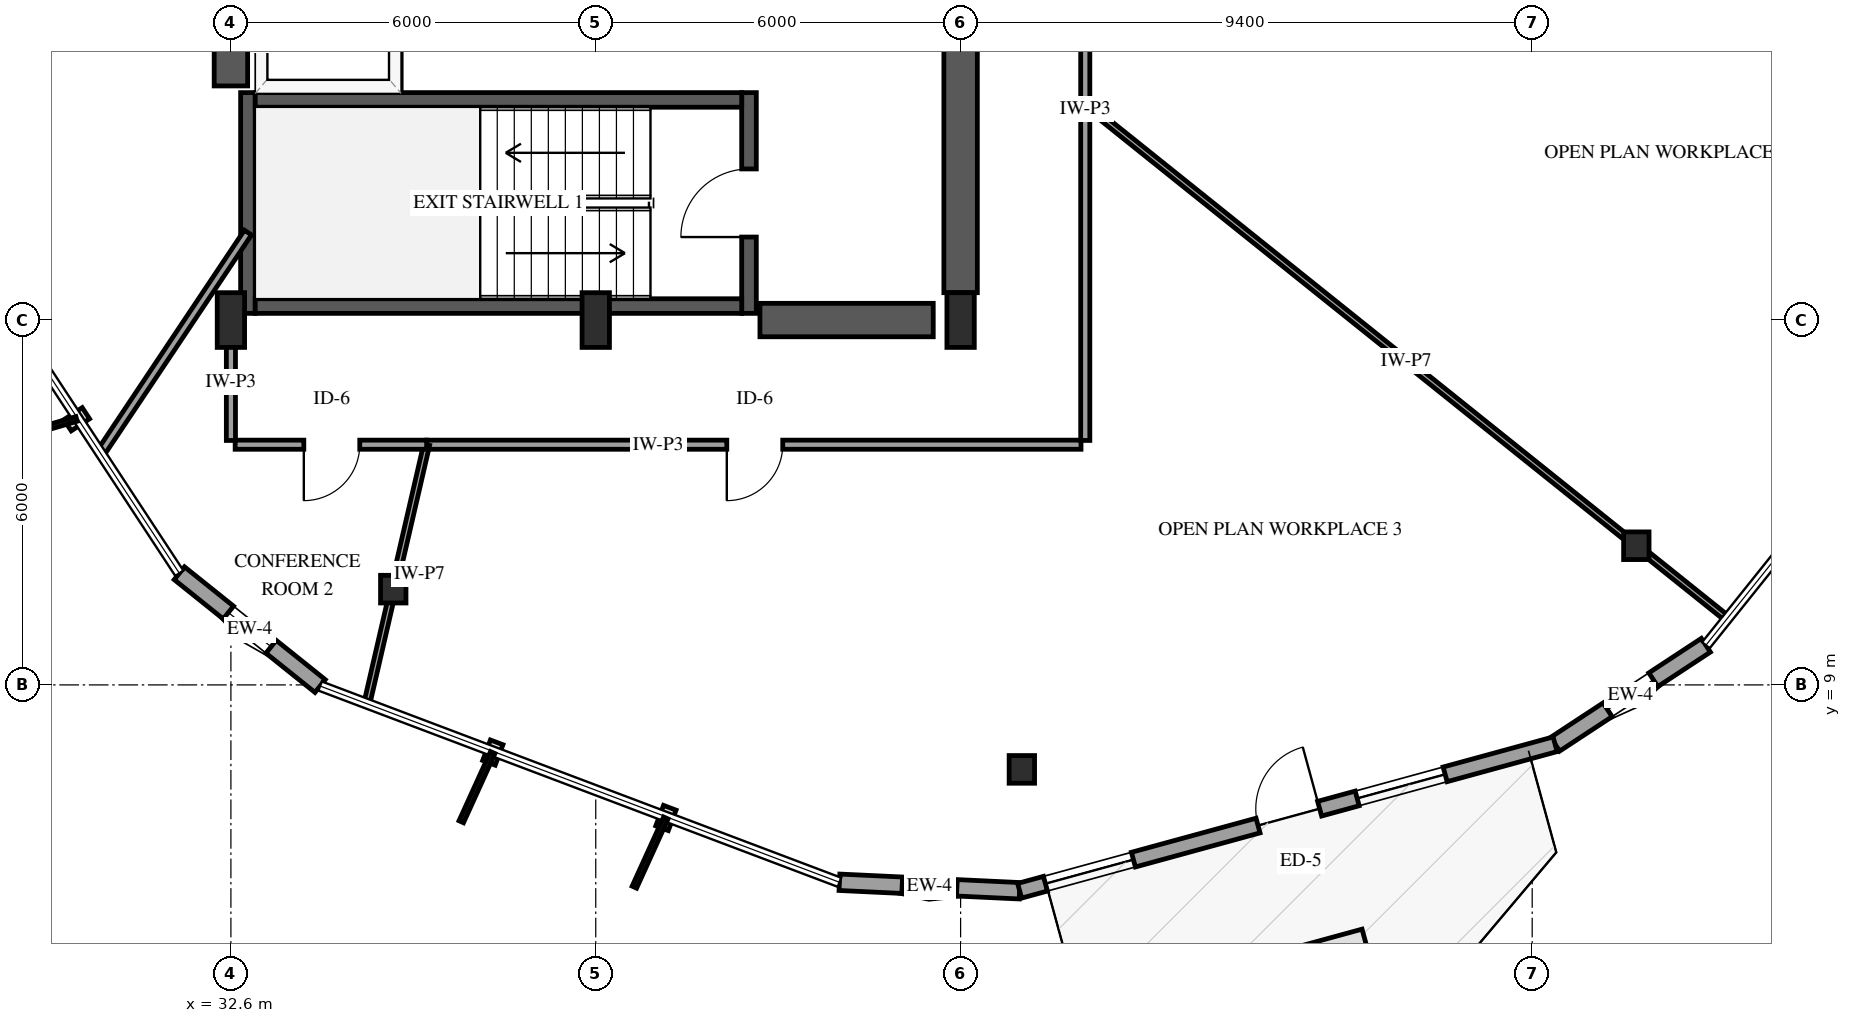
"""IFC4 building model, lengths in metres.
Left out: names, types, materials, properties, quantities, classifications, styles, units other than length and angle.
Written with IfcOpenShell. Run it as: python <this file> out.ifc"""

import sys

from ifc_helpers import new_model, si_unit, direction, frame, frame_2d, origin, origin_2d, place, context, subcontext, project, spatial, rectangle, i_section, extrude, element, fill, save


model = new_model("IFC4")
c1 = context("Model", 3, precision=1e-05, world=origin(), true_north=direction((0.0, 1.0)))
c2 = subcontext(c1, "Body", "Model", "MODEL_VIEW")
j1 = project(units=[si_unit("LENGTHUNIT", "METRE"), si_unit("PLANEANGLEUNIT", "RADIAN")], contexts=[c1])
p1 = place(None, origin())
s1 = spatial("IfcSite", under=j1, at=p1, CompositionType="ELEMENT")
p2 = place(p1, origin())
s2 = spatial("IfcBuilding", under=s1, at=p2, CompositionType="ELEMENT")
p3 = place(p2, frame((0.0, 0.0, 87.4)))
s3 = spatial("IfcBuildingStorey", under=s2, at=p3, CompositionType="ELEMENT", Elevation=87.4)
p4 = place(p3, frame((32.88, 15.11, 0.0), z_axis=(0.0, 0.0, 1.0), x_axis=(0.0, 1.0, 0.0)))
e1 = element("IfcWall", 1, at=p4, inside=s3, PredefinedType="SHEAR", context=c2, shape_type="SweptSolid", body=[
    extrude(rectangle(XDim=3.63, YDim=0.24, at=frame_2d((1.815, 0.0))), origin(), (0.0, 0.0, 1.0), 3.9),
])
p5 = place(p3, frame((41.12, 15.11, 0.0), z_axis=(0.0, 0.0, 1.0), x_axis=(0.0, 1.0, 0.0)))
e2 = element("IfcWall", 2, at=p5, inside=s3, PredefinedType="SHEAR", context=c2, shape_type="SweptSolid", body=[
    extrude(rectangle(XDim=3.63, YDim=0.24, at=frame_2d((1.815, 0.0))), origin(), (0.0, 0.0, 1.0), 3.9),
])
p6 = place(p5, frame((1.255, 0.0, 0.0)))
e3 = element("IfcOpeningElement", 3, at=p6, cuts=e2, PredefinedType="OPENING", context=c2, shape_type="SweptSolid", body=[
    extrude(rectangle(XDim=1.12, YDim=2.15, at=frame_2d((0.56, 1.075))), frame((0.0, 0.13, 0.0), z_axis=(0.0, -1.0, 0.0), x_axis=(1.0, 0.0, 0.0)), (0.0, 0.0, 1.0), 0.26),
])
for number, where, z_axis, x_axis in (
    (4, (33.0, 15.23, 0.0), (0.0, 0.0, 1.0), (1.0, 0.0, 0.0)),
    (5, (33.0, 18.62, 0.0), (0.0, 0.0, 1.0), (1.0, 0.0, 0.0)),
):
    element("IfcWall", number, at=place(p3, frame(where, z_axis=z_axis, x_axis=x_axis)), inside=s3, PredefinedType="SHEAR", context=c2, shape_type="SweptSolid", body=[
        extrude(rectangle(XDim=8.0, YDim=0.24, at=frame_2d((4.0, 0.0))), origin(), (0.0, 0.0, 1.0), 3.9),
    ])
p7 = place(p3, frame((32.6, 18.85, 0.0), z_axis=(0.0, 0.0, 1.0), x_axis=(0.0, 1.0, 0.0)))
e6 = element("IfcWall", 6, at=p7, inside=s3, PredefinedType="SHEAR", context=c2, shape_type="SweptSolid", body=[
    extrude(rectangle(XDim=12.3, YDim=0.55, at=frame_2d((6.15, 0.0))), origin(), (0.0, 0.0, 1.0), 3.9),
])
p8 = place(p3, frame((41.3, 15.0, 0.0), z_axis=(0.0, 0.0, 1.0), x_axis=(1.0, 0.0, 0.0)))
e7 = element("IfcWall", 7, at=p8, inside=s3, PredefinedType="SHEAR", context=c2, shape_type="SweptSolid", body=[
    extrude(rectangle(XDim=2.85, YDim=0.55, at=frame_2d((1.425, 0.0))), origin(), (0.0, 0.0, 1.0), 3.9),
])
p9 = place(p3, frame((44.6, 15.45, 0.0), z_axis=(0.0, 0.0, 1.0), x_axis=(0.0, 1.0, 0.0)))
e8 = element("IfcWall", 8, at=p9, inside=s3, PredefinedType="SHEAR", context=c2, shape_type="SweptSolid", body=[
    extrude(rectangle(XDim=6.35, YDim=0.55, at=frame_2d((3.175, 0.0))), origin(), (0.0, 0.0, 1.0), 3.9),
])
for number, where, z_axis, x_axis in (
    (9, (32.6, 15.0, -0.3), (0.0, 0.0, 1.0), (1.0, 0.0, 0.0)),
    (10, (38.6, 15.0, -0.3), (0.0, 0.0, 1.0), (1.0, 0.0, 0.0)),
    (11, (44.6, 15.0, -0.3), (0.0, 0.0, 1.0), (1.0, 0.0, 0.0)),
):
    element("IfcColumn", number, at=place(p3, frame(where, z_axis=z_axis, x_axis=x_axis)), inside=s3, PredefinedType="PILASTER", context=c2, shape_type="SweptSolid", body=[
        extrude(rectangle(XDim=0.45, YDim=0.9, at=origin_2d()), origin(), (0.0, 0.0, 1.0), 4.2),
    ])
for number, where, z_axis, x_axis in (
    (12, (35.27, 10.575, -0.3), (0.0, 0.0, 1.0), (1.0, 0.0, 0.0)),
    (13, (45.607, 7.611, -0.3), (0.0, 0.0, 1.0), (1.0, 0.0, 0.0)),
    (14, (55.712, 11.289, -0.3), (0.0, 0.0, 1.0), (1.0, 0.0, 0.0)),
):
    element("IfcColumn", number, at=place(p3, frame(where, z_axis=z_axis, x_axis=x_axis)), inside=s3, PredefinedType="COLUMN", context=c2, shape_type="SweptSolid", body=[
        extrude(i_section(OverallWidth=0.418, OverallDepth=0.455, WebThickness=0.042, FlangeThickness=0.068, FilletRadius=0.038, at=origin_2d()), origin(), (0.0, 0.0, 1.0), 4.2),
    ])
p10 = place(p3, frame((31.752, 10.836, 0.0), z_axis=(0.0, 0.0, 1.0), x_axis=(0.780443081308, -0.625226836307, 0.0)))
e15 = element("IfcWall", 15, at=p10, inside=s3, PredefinedType="SOLIDWALL", context=c2, shape_type="SweptSolid", body=[
    extrude(rectangle(XDim=2.967, YDim=0.27, at=frame_2d((1.483, 0.0))), origin(), (0.0, 0.0, 1.0), 2.979),
])
p11 = place(p10, frame((1.033, 0.0, 0.75)))
e16 = element("IfcOpeningElement", 16, at=p11, cuts=e15, PredefinedType="OPENING", context=c2, shape_type="SweptSolid", body=[
    extrude(rectangle(XDim=0.9, YDim=1.5, at=frame_2d((0.45, 0.75))), frame((0.0, 0.145, 0.0), z_axis=(0.0, -1.0, 0.0), x_axis=(1.0, 0.0, 0.0)), (0.0, 0.0, 1.0), 0.29),
])
p12 = place(p3, frame((42.607, 5.754, 0.0), z_axis=(0.0, 0.0, 1.0), x_axis=(0.998887602896, -0.04715460508, 0.0)))
e17 = element("IfcWall", 17, at=p12, inside=s3, PredefinedType="SOLIDWALL", context=c2, shape_type="SweptSolid", body=[
    extrude(rectangle(XDim=2.967, YDim=0.27, at=frame_2d((1.483, 0.0))), origin(), (0.0, 0.0, 1.0), 2.979),
])
p13 = place(p12, frame((1.033, 0.0, 0.75)))
e18 = element("IfcOpeningElement", 18, at=p13, cuts=e17, PredefinedType="OPENING", context=c2, shape_type="SweptSolid", body=[
    extrude(rectangle(XDim=0.9, YDim=1.5, at=frame_2d((0.45, 0.75))), frame((0.0, 0.145, 0.0), z_axis=(0.0, -1.0, 0.0), x_axis=(1.0, 0.0, 0.0)), (0.0, 0.0, 1.0), 0.29),
])
p14 = place(p3, frame((54.377, 8.024, 0.0), z_axis=(0.0, 0.0, 1.0), x_axis=(0.835816616247, 0.549008728533, 0.0)))
e19 = element("IfcWall", 19, at=p14, inside=s3, PredefinedType="SOLIDWALL", context=c2, shape_type="SweptSolid", body=[
    extrude(rectangle(XDim=2.967, YDim=0.27, at=frame_2d((1.483, 0.0))), origin(), (0.0, 0.0, 1.0), 2.979),
])
p15 = place(p14, frame((1.033, 0.0, 0.75)))
e20 = element("IfcOpeningElement", 20, at=p15, cuts=e19, PredefinedType="OPENING", context=c2, shape_type="SweptSolid", body=[
    extrude(rectangle(XDim=0.9, YDim=1.5, at=frame_2d((0.45, 0.75))), frame((0.0, 0.145, 0.0), z_axis=(0.0, -1.0, 0.0), x_axis=(1.0, 0.0, 0.0)), (0.0, 0.0, 1.0), 0.29),
])
p16 = place(p3, frame((45.571, 5.615, 0.0), z_axis=(0.0, 0.0, 1.0), x_axis=(0.964553074607, 0.263888927894, 0.0)))
e21 = element("IfcWall", 21, at=p16, inside=s3, PredefinedType="SOLIDWALL", context=c2, shape_type="SweptSolid", body=[
    extrude(rectangle(XDim=9.13, YDim=0.25, at=frame_2d((4.565, 0.0))), origin(), (0.0, 0.0, 1.0), 2.979),
])
p17 = place(p16, frame((4.065, 0.0, 0.0)))
e22 = element("IfcOpeningElement", 22, at=p17, cuts=e21, PredefinedType="OPENING", context=c2, shape_type="SweptSolid", body=[
    extrude(rectangle(XDim=1.05, YDim=2.15, at=frame_2d((0.525, 1.075))), frame((0.0, 0.135, 0.0), z_axis=(0.0, -1.0, 0.0), x_axis=(1.0, 0.0, 0.0)), (0.0, 0.0, 1.0), 0.27),
])
p18 = place(p16, frame((0.44, 0.0, 0.72)))
e23 = element("IfcOpeningElement", 23, at=p18, cuts=e21, PredefinedType="OPENING", context=c2, shape_type="SweptSolid", body=[
    extrude(rectangle(XDim=1.5, YDim=1.7, at=frame_2d((0.75, 0.85))), frame((0.0, 0.135, 0.0), z_axis=(0.0, -1.0, 0.0), x_axis=(1.0, 0.0, 0.0)), (0.0, 0.0, 1.0), 0.27),
])
p19 = place(p16, frame((5.755, 0.0, 0.72)))
e24 = element("IfcOpeningElement", 24, at=p19, cuts=e21, PredefinedType="OPENING", context=c2, shape_type="SweptSolid", body=[
    extrude(rectangle(XDim=1.5, YDim=1.7, at=frame_2d((0.75, 0.85))), frame((0.0, 0.135, 0.0), z_axis=(0.0, -1.0, 0.0), x_axis=(1.0, 0.0, 0.0)), (0.0, 0.0, 1.0), 0.27),
])
p20 = place(p3, frame((35.3, 18.79, 0.0), z_axis=(0.0, 0.0, 1.0), x_axis=(0.0, 1.0, 0.0)))
e25 = element("IfcWall", 25, at=p20, inside=s3, PredefinedType="SOLIDWALL", context=c2, shape_type="SweptSolid", body=[
    extrude(rectangle(XDim=2.55, YDim=0.2, at=frame_2d((1.275, 0.0))), origin(), (0.0, 0.0, 1.0), 3.6),
])
p21 = place(p20, frame((0.725, 0.0, 0.0)))
e26 = element("IfcOpeningElement", 26, at=p21, cuts=e25, PredefinedType="OPENING", context=c2, shape_type="SweptSolid", body=[
    extrude(rectangle(XDim=1.1, YDim=2.15, at=frame_2d((0.55, 1.075))), frame((0.0, 0.11, 0.0), z_axis=(0.0, -1.0, 0.0), x_axis=(1.0, 0.0, 0.0)), (0.0, 0.0, 1.0), 0.22),
])
p22 = place(p3, frame((46.65, 18.55, 0.0), z_axis=(0.0, 0.0, 1.0), x_axis=(0.780389673426, -0.625293497176, 0.0)))
e27 = element("IfcWall", 27, at=p22, inside=s3, PredefinedType="PARTITIONING", context=c2, shape_type="SweptSolid", body=[
    extrude(rectangle(XDim=13.528, YDim=0.1, at=frame_2d((6.764, 0.0))), origin(), (0.0, 0.0, 1.0), 3.6),
])
p23 = place(p3, frame((46.58, 12.95, 0.0), z_axis=(0.0, 0.0, 1.0), x_axis=(-1.0, 0.0, 0.0)))
e28 = element("IfcWall", 28, at=p23, inside=s3, PredefinedType="PARTITIONING", context=c2, shape_type="SweptSolid", body=[
    extrude(rectangle(XDim=10.761, YDim=0.15, at=frame_2d((5.38, 0.0))), origin(), (0.0, 0.0, 1.0), 3.6),
])
p24 = place(p23, frame((4.905, 0.0, 0.0)))
e29 = element("IfcOpeningElement", 29, at=p24, cuts=e28, PredefinedType="OPENING", context=c2, shape_type="SweptSolid", body=[
    extrude(rectangle(XDim=0.92, YDim=2.12, at=frame_2d((0.46, 1.06))), frame((0.0, 0.085, 0.0), z_axis=(0.0, -1.0, 0.0), x_axis=(1.0, 0.0, 0.0)), (0.0, 0.0, 1.0), 0.17),
])
p25 = place(p3, frame((46.65, 18.55, 0.0), z_axis=(0.0, 0.0, 1.0), x_axis=(0.0, -1.0, 0.0)))
e30 = element("IfcWall", 30, at=p25, inside=s3, PredefinedType="PARTITIONING", context=c2, shape_type="SweptSolid", body=[
    extrude(rectangle(XDim=5.53, YDim=0.15, at=frame_2d((2.765, 0.0))), origin(), (0.0, 0.0, 1.0), 3.6),
])
p26 = place(p3, frame((46.65, 23.93, 0.0), z_axis=(0.0, 0.0, 1.0), x_axis=(0.0, -1.0, 0.0)))
e31 = element("IfcWall", 31, at=p26, inside=s3, PredefinedType="PARTITIONING", context=c2, shape_type="SweptSolid", body=[
    extrude(rectangle(XDim=5.38, YDim=0.15, at=frame_2d((2.69, 0.0))), origin(), (0.0, 0.0, 1.0), 3.6),
])
p27 = place(p3, frame((35.819, 12.95, 0.0), z_axis=(0.0, 0.0, 1.0), x_axis=(-0.225136871807, -0.97432714678, 0.0)))
e32 = element("IfcWall", 32, at=p27, inside=s3, PredefinedType="PARTITIONING", context=c2, shape_type="SweptSolid", body=[
    extrude(rectangle(XDim=4.371, YDim=0.1, at=frame_2d((2.186, 0.0))), origin(), (0.0, 0.0, 1.0), 2.895),
])
p28 = place(p3, frame((32.88, 16.439, 0.0), z_axis=(0.0, 0.0, 1.0), x_axis=(-0.5557844679, -0.831326425203, 0.0)))
e33 = element("IfcWall", 33, at=p28, inside=s3, PredefinedType="PARTITIONING", context=c2, shape_type="SweptSolid", body=[
    extrude(rectangle(XDim=4.363, YDim=0.14, at=frame_2d((2.181, 0.0))), origin(), (0.0, 0.0, 1.0), 3.6),
])
p29 = place(p3, frame((35.819, 12.95, 0.0), z_axis=(0.0, 0.0, 1.0), x_axis=(-1.0, 0.0, 0.0)))
e34 = element("IfcWall", 34, at=p29, inside=s3, PredefinedType="PARTITIONING", context=c2, shape_type="SweptSolid", body=[
    extrude(rectangle(XDim=3.149, YDim=0.15, at=frame_2d((1.575, 0.0))), origin(), (0.0, 0.0, 1.0), 3.6),
])
p30 = place(p29, frame((1.1, 0.0, 0.0)))
e35 = element("IfcOpeningElement", 35, at=p30, cuts=e34, PredefinedType="OPENING", context=c2, shape_type="SweptSolid", body=[
    extrude(rectangle(XDim=0.92, YDim=2.12, at=frame_2d((0.46, 1.06))), frame((0.0, 0.085, 0.0), z_axis=(0.0, -1.0, 0.0), x_axis=(1.0, 0.0, 0.0)), (0.0, 0.0, 1.0), 0.17),
])
p31 = place(p3, frame((32.6, 13.02, 0.0), z_axis=(0.0, 0.0, 1.0), x_axis=(0.0, 1.0, 0.0)))
e36 = element("IfcWall", 36, at=p31, inside=s3, PredefinedType="PARTITIONING", context=c2, shape_type="SweptSolid", body=[
    extrude(rectangle(XDim=1.91, YDim=0.15, at=frame_2d((0.955, 0.0))), origin(), (0.0, 0.0, 1.0), 3.6),
])
p32 = place(p11, origin())
e37 = element("IfcWindow", 37, at=p32, inside=s3, PartitioningType="SINGLE_PANEL", PredefinedType="WINDOW", context=c2, shape_type="SweptSolid", body=[
    extrude(rectangle(XDim=0.9, YDim=1.5, at=frame_2d((0.45, 0.75))), frame((0.0, 0.03, 0.0), z_axis=(0.0, -1.0, 0.0), x_axis=(1.0, 0.0, 0.0)), (0.0, 0.0, 1.0), 0.06),
])
fill(e16, e37)
p33 = place(p13, origin())
e38 = element("IfcWindow", 38, at=p33, inside=s3, PartitioningType="SINGLE_PANEL", PredefinedType="WINDOW", context=c2, shape_type="SweptSolid", body=[
    extrude(rectangle(XDim=0.9, YDim=1.5, at=frame_2d((0.45, 0.75))), frame((0.0, 0.03, 0.0), z_axis=(0.0, -1.0, 0.0), x_axis=(1.0, 0.0, 0.0)), (0.0, 0.0, 1.0), 0.06),
])
fill(e18, e38)
p34 = place(p15, origin())
e39 = element("IfcWindow", 39, at=p34, inside=s3, PartitioningType="SINGLE_PANEL", PredefinedType="WINDOW", context=c2, shape_type="SweptSolid", body=[
    extrude(rectangle(XDim=0.9, YDim=1.5, at=frame_2d((0.45, 0.75))), frame((0.0, 0.03, 0.0), z_axis=(0.0, -1.0, 0.0), x_axis=(1.0, 0.0, 0.0)), (0.0, 0.0, 1.0), 0.06),
])
fill(e20, e39)
p35 = place(p17, origin())
e40 = element("IfcDoor", 40, at=p35, inside=s3, OperationType="SINGLE_SWING_RIGHT", PredefinedType="DOOR", context=c2, shape_type="SweptSolid", body=[
    extrude(rectangle(XDim=1.05, YDim=2.15, at=frame_2d((0.525, 1.075))), frame((0.0, 0.025, 0.0), z_axis=(0.0, -1.0, 0.0), x_axis=(1.0, 0.0, 0.0)), (0.0, 0.0, 1.0), 0.05),
])
fill(e22, e40)
p36 = place(p18, origin())
e41 = element("IfcWindow", 41, at=p36, inside=s3, PartitioningType="SINGLE_PANEL", PredefinedType="WINDOW", context=c2, shape_type="SweptSolid", body=[
    extrude(rectangle(XDim=1.5, YDim=1.7, at=frame_2d((0.75, 0.85))), frame((0.0, 0.03, 0.0), z_axis=(0.0, -1.0, 0.0), x_axis=(1.0, 0.0, 0.0)), (0.0, 0.0, 1.0), 0.06),
])
fill(e23, e41)
p37 = place(p19, origin())
e42 = element("IfcWindow", 42, at=p37, inside=s3, PartitioningType="SINGLE_PANEL", PredefinedType="WINDOW", context=c2, shape_type="SweptSolid", body=[
    extrude(rectangle(XDim=1.5, YDim=1.7, at=frame_2d((0.75, 0.85))), frame((0.0, 0.03, 0.0), z_axis=(0.0, -1.0, 0.0), x_axis=(1.0, 0.0, 0.0)), (0.0, 0.0, 1.0), 0.06),
])
fill(e24, e42)
p38 = place(p6, origin())
e43 = element("IfcDoor", 43, at=p38, inside=s3, OperationType="SINGLE_SWING_LEFT", PredefinedType="DOOR", context=c2, shape_type="SweptSolid", body=[
    extrude(rectangle(XDim=1.12, YDim=2.15, at=frame_2d((0.56, 1.075))), frame((0.0, 0.025, 0.0), z_axis=(0.0, -1.0, 0.0), x_axis=(1.0, 0.0, 0.0)), (0.0, 0.0, 1.0), 0.05),
])
fill(e3, e43)
p39 = place(p24, origin())
e44 = element("IfcDoor", 44, at=p39, inside=s3, OperationType="SINGLE_SWING_RIGHT", PredefinedType="DOOR", context=c2, shape_type="SweptSolid", body=[
    extrude(rectangle(XDim=0.92, YDim=2.12, at=frame_2d((0.46, 1.06))), frame((0.0, 0.025, 0.0), z_axis=(0.0, -1.0, 0.0), x_axis=(1.0, 0.0, 0.0)), (0.0, 0.0, 1.0), 0.05),
])
fill(e29, e44)
p40 = place(p30, origin())
e45 = element("IfcDoor", 45, at=p40, inside=s3, OperationType="SINGLE_SWING_RIGHT", PredefinedType="DOOR", context=c2, shape_type="SweptSolid", body=[
    extrude(rectangle(XDim=0.92, YDim=2.12, at=frame_2d((0.46, 1.06))), frame((0.0, 0.025, 0.0), z_axis=(0.0, -1.0, 0.0), x_axis=(1.0, 0.0, 0.0)), (0.0, 0.0, 1.0), 0.05),
])
fill(e35, e45)
save(model, sys.argv[1])
